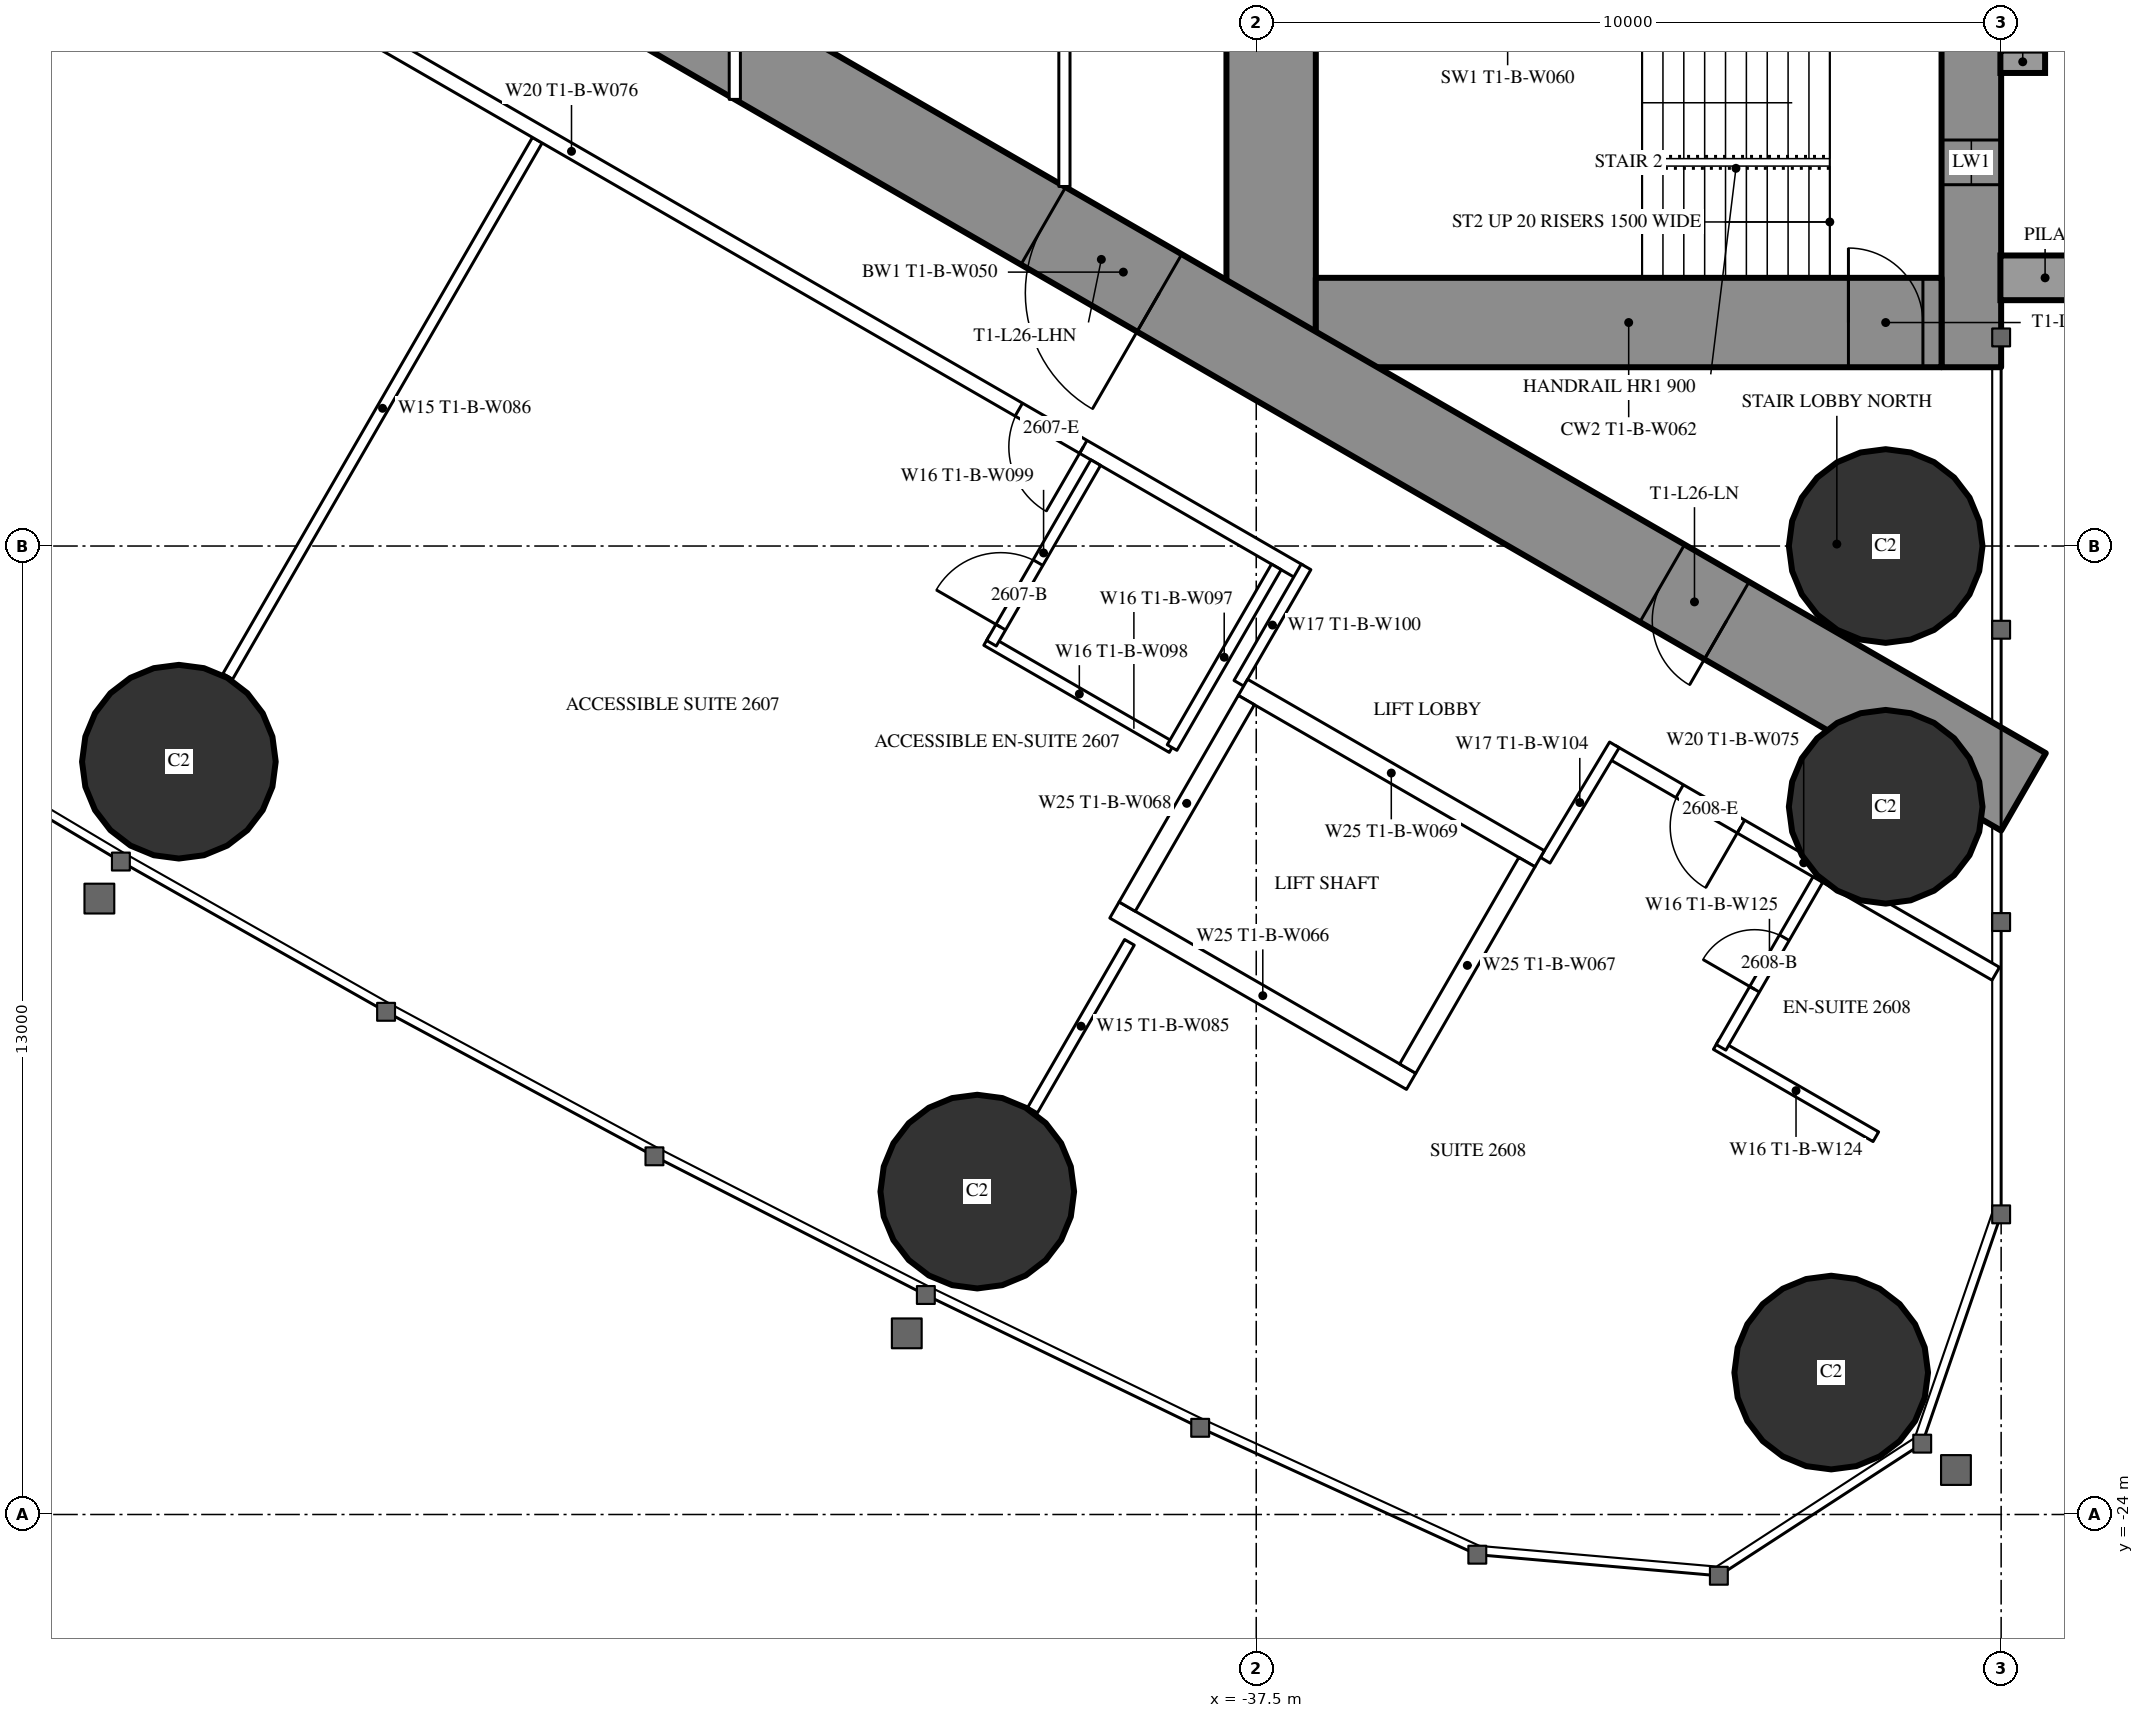
"""IFC4 building model, lengths in metres.
Left out: names, types, materials, properties, quantities, classifications, styles, units other than length and angle.
Written with IfcOpenShell. Run it as: python <this file> out.ifc"""

import sys

from ifc_helpers import new_model, si_unit, direction, frame, frame_2d, origin, origin_2d, place, context, subcontext, project, spatial, rectangle, hollow_circle, extrude, element, fill, save


model = new_model("IFC4")
c1 = context("Model", 3, precision=1e-05, world=origin(), true_north=direction((0.0, 1.0)))
c2 = subcontext(c1, "Body", "Model", "MODEL_VIEW")
j1 = project(units=[si_unit("LENGTHUNIT", "METRE"), si_unit("PLANEANGLEUNIT", "RADIAN")], contexts=[c1])
p1 = place(None, origin())
s1 = spatial("IfcSite", under=j1, at=p1, CompositionType="ELEMENT")
p2 = place(p1, origin())
s2 = spatial("IfcBuilding", under=s1, at=p2, CompositionType="ELEMENT")
p3 = place(p2, frame((0.0, 0.0, 101.1)))
s3 = spatial("IfcBuildingStorey", under=s2, at=p3, CompositionType="ELEMENT", Elevation=101.1)
for number, where, z_axis, x_axis in (
    (1, (-29.781, -22.095, 0.0), (0.0, 0.0, 1.0), (1.0, 0.0, 0.0)),
    (2, (-29.05, -11.0, 0.0), (0.0, 0.0, 1.0), (1.0, 0.0, 0.0)),
    (3, (-29.05, -14.5, 0.0), (0.0, 0.0, 1.0), (1.0, 0.0, 0.0)),
    (4, (-51.963, -13.895, 0.0), (0.0, 0.0, 1.0), (1.0, 0.0, 0.0)),
    (5, (-41.245, -19.666, 0.0), (0.0, 0.0, 1.0), (1.0, 0.0, 0.0)),
):
    element("IfcColumn", number, at=place(p3, frame(where, z_axis=z_axis, x_axis=x_axis)), inside=s3, PredefinedType="COLUMN", context=c2, shape_type="SweptSolid", body=[
        extrude(hollow_circle(Radius=1.3, WallThickness=0.1, at=origin_2d()), origin(), (0.0, 0.0, 1.0), 3.5),
    ])
p4 = place(p3, frame((-27.9, 8.6, 0.0), z_axis=(0.0, 0.0, 1.0), x_axis=(0.0, -1.0, 0.0)))
e6 = element("IfcWall", 6, at=p4, inside=s3, PredefinedType="SHEAR", context=c2, shape_type="SweptSolid", body=[
    extrude(rectangle(XDim=17.2, YDim=0.8, at=frame_2d((8.6, 0.0))), origin(), (0.0, 0.0, 1.0), 3.5),
])
p5 = place(p4, frame((2.45, 0.0, 0.6)))
e7 = element("IfcOpeningElement", 7, at=p5, cuts=e6, PredefinedType="OPENING", context=c2, shape_type="SweptSolid", body=[
    extrude(rectangle(XDim=0.6, YDim=2.1, at=frame_2d((0.3, 1.05))), frame((0.0, 0.41, 0.0), z_axis=(0.0, -1.0, 0.0), x_axis=(1.0, 0.0, 0.0)), (0.0, 0.0, 1.0), 0.82),
])
p6 = place(p4, frame((14.15, 0.0, 0.6)))
e8 = element("IfcOpeningElement", 8, at=p6, cuts=e6, PredefinedType="OPENING", context=c2, shape_type="SweptSolid", body=[
    extrude(rectangle(XDim=0.6, YDim=2.1, at=frame_2d((0.3, 1.05))), frame((0.0, 0.41, 0.0), z_axis=(0.0, -1.0, 0.0), x_axis=(1.0, 0.0, 0.0)), (0.0, 0.0, 1.0), 0.82),
])
p7 = place(p3, frame((-37.3, 8.6, 0.0), z_axis=(0.0, 0.0, 1.0), x_axis=(0.0, -1.0, 0.0)))
e9 = element("IfcWall", 9, at=p7, inside=s3, PredefinedType="SHEAR", context=c2, shape_type="SweptSolid", body=[
    extrude(rectangle(XDim=17.2, YDim=1.2, at=frame_2d((8.6, 0.0))), origin(), (0.0, 0.0, 1.0), 3.5),
])
p8 = place(p7, frame((7.7, 0.0, 0.0)))
e10 = element("IfcOpeningElement", 10, at=p8, cuts=e9, PredefinedType="OPENING", context=c2, shape_type="SweptSolid", body=[
    extrude(rectangle(XDim=1.8, YDim=2.2, at=frame_2d((0.9, 1.1))), frame((0.0, 0.61, 0.0), z_axis=(0.0, -1.0, 0.0), x_axis=(1.0, 0.0, 0.0)), (0.0, 0.0, 1.0), 1.22),
])
p9 = place(p3, frame((-28.3, -8.0, 0.0), z_axis=(0.0, 0.0, 1.0), x_axis=(-1.0, 0.0, 0.0)))
e11 = element("IfcWall", 11, at=p9, inside=s3, PredefinedType="SHEAR", context=c2, shape_type="SweptSolid", body=[
    extrude(rectangle(XDim=8.4, YDim=1.2, at=frame_2d((4.2, 0.0))), origin(), (0.0, 0.0, 1.0), 3.5),
])
p10 = place(p9, frame((0.25, 0.0, 0.0)))
e12 = element("IfcOpeningElement", 12, at=p10, cuts=e11, PredefinedType="OPENING", context=c2, shape_type="SweptSolid", body=[
    extrude(rectangle(XDim=1.0, YDim=2.2, at=frame_2d((0.5, 1.1))), frame((0.0, 0.61, 0.0), z_axis=(0.0, -1.0, 0.0), x_axis=(1.0, 0.0, 0.0)), (0.0, 0.0, 1.0), 1.22),
])
p11 = place(p3, frame((-27.2, -14.3, 0.0), z_axis=(0.0, 0.0, 1.0), x_axis=(-0.866024021859, 0.500002393557, 0.0)))
e13 = element("IfcWall", 13, at=p11, inside=s3, PredefinedType="SHEAR", context=c2, shape_type="SweptSolid", body=[
    extrude(rectangle(XDim=27.907, YDim=1.2, at=frame_2d((13.954, 0.0))), origin(), (0.0, 0.0, 1.0), 3.5),
])
p12 = place(p11, frame((4.6, 0.0, 0.0)))
e14 = element("IfcOpeningElement", 14, at=p12, cuts=e13, PredefinedType="OPENING", context=c2, shape_type="SweptSolid", body=[
    extrude(rectangle(XDim=1.0, YDim=2.2, at=frame_2d((0.5, 1.1))), frame((0.0, 0.61, 0.0), z_axis=(0.0, -1.0, 0.0), x_axis=(1.0, 0.0, 0.0)), (0.0, 0.0, 1.0), 1.22),
])
p13 = place(p11, frame((13.395, 0.0, 0.0)))
e15 = element("IfcOpeningElement", 15, at=p13, cuts=e13, PredefinedType="OPENING", context=c2, shape_type="SweptSolid", body=[
    extrude(rectangle(XDim=1.8, YDim=2.2, at=frame_2d((0.9, 1.1))), frame((0.0, 0.61, 0.0), z_axis=(0.0, -1.0, 0.0), x_axis=(1.0, 0.0, 0.0)), (0.0, 0.0, 1.0), 1.22),
])
p14 = place(p3, frame((-47.151, -5.552, 0.0), z_axis=(0.0, 0.0, 1.0), x_axis=(-0.500003012045, -0.866023664773, 0.0)))
e16 = element("IfcWall", 16, at=p14, inside=s3, PredefinedType="PARTITIONING", context=c2, shape_type="SweptSolid", body=[
    extrude(rectangle(XDim=8.311, YDim=0.15, at=frame_2d((4.156, 0.0))), origin(), (0.0, 0.0, 1.0), 2.2),
])
p15 = place(p3, frame((-39.202, -16.32, 0.0), z_axis=(0.0, 0.0, 1.0), x_axis=(-0.49997716683, -0.86603858612, 0.0)))
e17 = element("IfcWall", 17, at=p15, inside=s3, PredefinedType="PARTITIONING", context=c2, shape_type="SweptSolid", body=[
    extrude(rectangle(XDim=2.6, YDim=0.15, at=frame_2d((1.3, 0.0))), origin(), (0.0, 0.0, 1.0), 3.25),
])
p16 = place(p3, frame((-27.572, -16.741, 0.0), z_axis=(0.0, 0.0, 1.0), x_axis=(-0.866024464444, 0.500001626982, 0.0)))
e18 = element("IfcWall", 18, at=p16, inside=s3, PredefinedType="PARTITIONING", context=c2, shape_type="SweptSolid", body=[
    extrude(rectangle(XDim=5.955, YDim=0.2, at=frame_2d((2.978, 0.0))), origin(), (0.0, 0.0, 1.0), 3.25),
])
p17 = place(p16, frame((3.95, 0.0, 0.0)))
e19 = element("IfcOpeningElement", 19, at=p17, cuts=e18, PredefinedType="OPENING", context=c2, shape_type="SweptSolid", body=[
    extrude(rectangle(XDim=0.95, YDim=2.2, at=frame_2d((0.475, 1.1))), frame((0.0, 0.11, 0.0), z_axis=(0.0, -1.0, 0.0), x_axis=(1.0, 0.0, 0.0)), (0.0, 0.0, 1.0), 0.22),
])
p18 = place(p3, frame((-36.92, -11.344, 0.0), z_axis=(0.0, 0.0, 1.0), x_axis=(-0.866028313256, 0.499994960614, 0.0)))
e20 = element("IfcWall", 20, at=p18, inside=s3, PredefinedType="PARTITIONING", context=c2, shape_type="SweptSolid", body=[
    extrude(rectangle(XDim=22.568, YDim=0.2, at=frame_2d((11.284, 0.0))), origin(), (0.0, 0.0, 1.0), 3.25),
])
p19 = place(p18, frame((21.018, 0.0, 0.0)))
e21 = element("IfcOpeningElement", 21, at=p19, cuts=e20, PredefinedType="OPENING", context=c2, shape_type="SweptSolid", body=[
    extrude(rectangle(XDim=0.95, YDim=2.2, at=frame_2d((0.475, 1.1))), frame((0.0, 0.11, 0.0), z_axis=(0.0, -1.0, 0.0), x_axis=(1.0, 0.0, 0.0)), (0.0, 0.0, 1.0), 0.22),
])
p20 = place(p18, frame((3.35, 0.0, 0.0)))
e22 = element("IfcOpeningElement", 22, at=p20, cuts=e20, PredefinedType="OPENING", context=c2, shape_type="SweptSolid", body=[
    extrude(rectangle(XDim=1.0, YDim=2.2, at=frame_2d((0.5, 1.1))), frame((0.0, 0.11, 0.0), z_axis=(0.0, -1.0, 0.0), x_axis=(1.0, 0.0, 0.0)), (0.0, 0.0, 1.0), 0.22),
])
p21 = place(p3, frame((-36.831, -11.28, 0.0), z_axis=(0.0, 0.0, 1.0), x_axis=(-0.499937177781, -0.866061671171, 0.0)))
e23 = element("IfcWall", 23, at=p21, inside=s3, PredefinedType="PARTITIONING", context=c2, shape_type="SweptSolid", body=[
    extrude(rectangle(XDim=1.804, YDim=0.15, at=frame_2d((0.902, 0.0))), origin(), (0.0, 0.0, 1.0), 3.25),
])
p22 = place(p3, frame((-33.621, -15.218, 0.0), z_axis=(0.0, 0.0, 1.0), x_axis=(0.514336634837, 0.857588377991, 0.0)))
e24 = element("IfcWall", 24, at=p22, inside=s3, PredefinedType="PARTITIONING", context=c2, shape_type="SweptSolid", body=[
    extrude(rectangle(XDim=1.805, YDim=0.15, at=frame_2d((0.903, 0.0))), origin(), (0.0, 0.0, 1.0), 3.25),
])
p23 = place(p3, frame((-38.63, -13.705, 0.0), z_axis=(0.0, 0.0, 1.0), x_axis=(-0.866018712932, 0.500011588718, 0.0)))
e25 = element("IfcWall", 25, at=p23, inside=s3, PredefinedType="PARTITIONING", context=c2, shape_type="SweptSolid", body=[
    extrude(rectangle(XDim=2.875, YDim=0.15, at=frame_2d((1.438, 0.0))), origin(), (0.0, 0.0, 1.0), 3.25),
])
p24 = place(p3, frame((-39.655, -9.88, 0.0), z_axis=(0.0, 0.0, 1.0), x_axis=(-0.500049511043, -0.865996816683, 0.0)))
e26 = element("IfcWall", 26, at=p24, inside=s3, PredefinedType="PARTITIONING", context=c2, shape_type="SweptSolid", body=[
    extrude(rectangle(XDim=2.8, YDim=0.15, at=frame_2d((1.4, 0.0))), origin(), (0.0, 0.0, 1.0), 3.25),
])
p25 = place(p24, frame((1.55, 0.0, 0.0)))
e27 = element("IfcOpeningElement", 27, at=p25, cuts=e26, PredefinedType="OPENING", context=c2, shape_type="SweptSolid", body=[
    extrude(rectangle(XDim=1.0, YDim=2.2, at=frame_2d((0.5, 1.1))), frame((0.0, 0.085, 0.0), z_axis=(0.0, -1.0, 0.0), x_axis=(1.0, 0.0, 0.0)), (0.0, 0.0, 1.0), 0.17),
])
p26 = place(p3, frame((-37.23, -11.281, 0.0), z_axis=(0.0, 0.0, 1.0), x_axis=(-0.500049511043, -0.865996816683, 0.0)))
e28 = element("IfcWall", 28, at=p26, inside=s3, PredefinedType="PARTITIONING", context=c2, shape_type="SweptSolid", body=[
    extrude(rectangle(XDim=2.8, YDim=0.15, at=frame_2d((1.4, 0.0))), origin(), (0.0, 0.0, 1.0), 3.25),
])
p27 = place(p3, frame((-29.182, -18.929, 0.0), z_axis=(0.0, 0.0, 1.0), x_axis=(-0.866006523861, 0.500032699561, 0.0)))
e29 = element("IfcWall", 29, at=p27, inside=s3, PredefinedType="PARTITIONING", context=c2, shape_type="SweptSolid", body=[
    extrude(rectangle(XDim=2.475, YDim=0.15, at=frame_2d((1.237, 0.0))), origin(), (0.0, 0.0, 1.0), 3.25),
])
p28 = place(p3, frame((-29.96, -15.478, 0.0), z_axis=(0.0, 0.0, 1.0), x_axis=(-0.500006934395, -0.866021400173, 0.0)))
e30 = element("IfcWall", 30, at=p28, inside=s3, PredefinedType="PARTITIONING", context=c2, shape_type="SweptSolid", body=[
    extrude(rectangle(XDim=2.6, YDim=0.15, at=frame_2d((1.3, 0.0))), origin(), (0.0, 0.0, 1.0), 3.25),
])
p29 = place(p28, frame((0.9, 0.0, 0.0)))
e31 = element("IfcOpeningElement", 31, at=p29, cuts=e30, PredefinedType="OPENING", context=c2, shape_type="SweptSolid", body=[
    extrude(rectangle(XDim=0.8, YDim=2.2, at=frame_2d((0.4, 1.1))), frame((0.0, 0.085, 0.0), z_axis=(0.0, -1.0, 0.0), x_axis=(1.0, 0.0, 0.0)), (0.0, 0.0, 1.0), 0.17),
])
p30 = place(p3, frame((-40.075, 1.2, 0.0), z_axis=(0.0, 0.0, 1.0), x_axis=(0.0, -1.0, 0.0)))
e32 = element("IfcWall", 32, at=p30, inside=s3, PredefinedType="PARTITIONING", context=c2, shape_type="SweptSolid", body=[
    extrude(rectangle(XDim=7.374, YDim=0.15, at=frame_2d((3.687, 0.0))), origin(), (0.0, 0.0, 1.0), 3.25),
])
p31 = place(p30, frame((2.787, 0.0, 0.0)))
e33 = element("IfcOpeningElement", 33, at=p31, cuts=e32, PredefinedType="OPENING", context=c2, shape_type="SweptSolid", body=[
    extrude(rectangle(XDim=1.8, YDim=2.2, at=frame_2d((0.9, 1.1))), frame((0.0, 0.085, 0.0), z_axis=(0.0, -1.0, 0.0), x_axis=(1.0, 0.0, 0.0)), (0.0, 0.0, 1.0), 0.17),
])
p32 = place(p3, frame((-44.5, 5.005, 0.0), z_axis=(0.0, 0.0, 1.0), x_axis=(0.0, -1.0, 0.0)))
e34 = element("IfcWall", 34, at=p32, inside=s3, PredefinedType="PARTITIONING", context=c2, shape_type="SweptSolid", body=[
    extrude(rectangle(XDim=10.009, YDim=0.15, at=frame_2d((5.005, 0.0))), origin(), (0.0, 0.0, 1.0), 2.45),
])
p33 = place(p32, frame((4.505, 0.0, 0.0)))
e35 = element("IfcOpeningElement", 35, at=p33, cuts=e34, PredefinedType="OPENING", context=c2, shape_type="SweptSolid", body=[
    extrude(rectangle(XDim=1.0, YDim=2.2, at=frame_2d((0.5, 1.1))), frame((0.0, 0.085, 0.0), z_axis=(0.0, -1.0, 0.0), x_axis=(1.0, 0.0, 0.0)), (0.0, 0.0, 1.0), 0.17),
])
p34 = place(p3, frame((-33.696, -15.197, 0.0), z_axis=(0.0, 0.0, 1.0), x_axis=(-0.865976953817, 0.500083908417, 0.0)))
e36 = element("IfcWall", 36, at=p34, inside=s3, PredefinedType="PARTITIONING", context=c2, shape_type="SweptSolid", body=[
    extrude(rectangle(XDim=4.599, YDim=0.25, at=frame_2d((2.3, 0.0))), origin(), (0.0, 0.0, 1.0), 3.25),
])
p35 = place(p3, frame((-35.42, -18.186, 0.0), z_axis=(0.0, 0.0, 1.0), x_axis=(-0.865990227814, 0.50006092162, 0.0)))
e37 = element("IfcWall", 37, at=p35, inside=s3, PredefinedType="PARTITIONING", context=c2, shape_type="SweptSolid", body=[
    extrude(rectangle(XDim=4.6, YDim=0.25, at=frame_2d((2.3, 0.0))), origin(), (0.0, 0.0, 1.0), 3.25),
])
p36 = place(p3, frame((-33.866, -15.243, 0.0), z_axis=(0.0, 0.0, 1.0), x_axis=(-0.499929347863, -0.866066190972, 0.0)))
e38 = element("IfcWall", 38, at=p36, inside=s3, PredefinedType="PARTITIONING", context=c2, shape_type="SweptSolid", body=[
    extrude(rectangle(XDim=3.201, YDim=0.25, at=frame_2d((1.6, 0.0))), origin(), (0.0, 0.0, 1.0), 3.25),
])
p37 = place(p3, frame((-37.633, -13.068, 0.0), z_axis=(0.0, 0.0, 1.0), x_axis=(-0.499872130319, -0.866099216793, 0.0)))
e39 = element("IfcWall", 39, at=p37, inside=s3, PredefinedType="PARTITIONING", context=c2, shape_type="SweptSolid", body=[
    extrude(rectangle(XDim=3.2, YDim=0.25, at=frame_2d((1.6, 0.0))), origin(), (0.0, 0.0, 1.0), 3.25),
])
p38 = place(p25, origin())
e40 = element("IfcDoor", 40, at=p38, inside=s3, OperationType="SINGLE_SWING_RIGHT", PredefinedType="DOOR", context=c2, shape_type="SweptSolid", body=[
    extrude(rectangle(XDim=1.0, YDim=2.2, at=frame_2d((0.5, 1.1))), frame((0.0, 0.025, 0.0), z_axis=(0.0, -1.0, 0.0), x_axis=(1.0, 0.0, 0.0)), (0.0, 0.0, 1.0), 0.05),
])
fill(e27, e40)
p39 = place(p20, origin())
e41 = element("IfcDoor", 41, at=p39, inside=s3, OperationType="SINGLE_SWING_LEFT", PredefinedType="DOOR", context=c2, shape_type="SweptSolid", body=[
    extrude(rectangle(XDim=1.0, YDim=2.2, at=frame_2d((0.5, 1.1))), frame((0.0, 0.025, 0.0), z_axis=(0.0, -1.0, 0.0), x_axis=(1.0, 0.0, 0.0)), (0.0, 0.0, 1.0), 0.05),
])
fill(e22, e41)
p40 = place(p29, origin())
e42 = element("IfcDoor", 42, at=p40, inside=s3, OperationType="SINGLE_SWING_RIGHT", PredefinedType="DOOR", context=c2, shape_type="SweptSolid", body=[
    extrude(rectangle(XDim=0.8, YDim=2.2, at=frame_2d((0.4, 1.1))), frame((0.0, 0.025, 0.0), z_axis=(0.0, -1.0, 0.0), x_axis=(1.0, 0.0, 0.0)), (0.0, 0.0, 1.0), 0.05),
])
fill(e31, e42)
p41 = place(p17, origin())
e43 = element("IfcDoor", 43, at=p41, inside=s3, OperationType="SINGLE_SWING_LEFT", PredefinedType="DOOR", context=c2, shape_type="SweptSolid", body=[
    extrude(rectangle(XDim=0.95, YDim=2.2, at=frame_2d((0.475, 1.1))), frame((0.0, 0.025, 0.0), z_axis=(0.0, -1.0, 0.0), x_axis=(1.0, 0.0, 0.0)), (0.0, 0.0, 1.0), 0.05),
])
fill(e19, e43)
p42 = place(p12, origin())
e44 = element("IfcDoor", 44, at=p42, inside=s3, OperationType="SINGLE_SWING_LEFT", PredefinedType="DOOR", context=c2, shape_type="SweptSolid", body=[
    extrude(rectangle(XDim=1.0, YDim=2.2, at=frame_2d((0.5, 1.1))), frame((0.0, 0.025, 0.0), z_axis=(0.0, -1.0, 0.0), x_axis=(1.0, 0.0, 0.0)), (0.0, 0.0, 1.0), 0.05),
])
fill(e14, e44)
p43 = place(p13, origin())
e45 = element("IfcDoor", 45, at=p43, inside=s3, OperationType="DOUBLE_DOOR_SINGLE_SWING", PredefinedType="DOOR", context=c2, shape_type="SweptSolid", body=[
    extrude(rectangle(XDim=1.8, YDim=2.2, at=frame_2d((0.9, 1.1))), frame((0.0, 0.025, 0.0), z_axis=(0.0, -1.0, 0.0), x_axis=(1.0, 0.0, 0.0)), (0.0, 0.0, 1.0), 0.05),
])
fill(e15, e45)
p44 = place(p10, origin())
e46 = element("IfcDoor", 46, at=p44, inside=s3, OperationType="SINGLE_SWING_RIGHT", PredefinedType="DOOR", context=c2, shape_type="SweptSolid", body=[
    extrude(rectangle(XDim=1.0, YDim=2.2, at=frame_2d((0.5, 1.1))), frame((0.0, 0.025, 0.0), z_axis=(0.0, -1.0, 0.0), x_axis=(1.0, 0.0, 0.0)), (0.0, 0.0, 1.0), 0.05),
])
fill(e12, e46)
p45 = place(p6, origin())
e47 = element("IfcWindow", 47, at=p45, inside=s3, PartitioningType="SINGLE_PANEL", PredefinedType="WINDOW", context=c2, shape_type="SweptSolid", body=[
    extrude(rectangle(XDim=0.6, YDim=2.1, at=frame_2d((0.3, 1.05))), frame((0.0, 0.03, 0.0), z_axis=(0.0, -1.0, 0.0), x_axis=(1.0, 0.0, 0.0)), (0.0, 0.0, 1.0), 0.06),
])
fill(e8, e47)
save(model, sys.argv[1])
